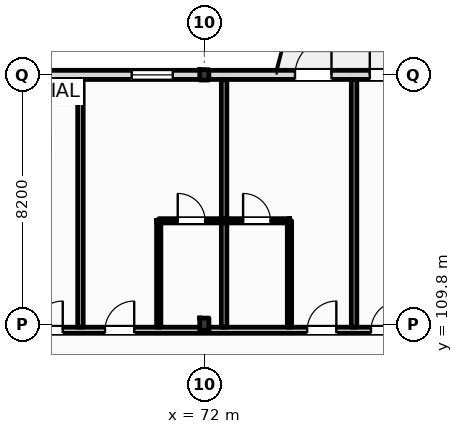
"""IFC4 building model, lengths in metres.
Left out: names, types, materials, properties, quantities, classifications, styles, units other than length and angle.
Written with IfcOpenShell. Run it as: python <this file> out.ifc"""

import sys

from ifc_helpers import new_model, si_unit, direction, frame, frame_2d, origin, origin_2d, place, context, subcontext, project, spatial, rectangle, i_section, extrude, element, fill, save


model = new_model("IFC4")
c1 = context("Model", 3, precision=1e-05, world=origin(), true_north=direction((0.0, 1.0)))
c2 = subcontext(c1, "Body", "Model", "MODEL_VIEW")
j1 = project(units=[si_unit("LENGTHUNIT", "METRE"), si_unit("PLANEANGLEUNIT", "RADIAN")], contexts=[c1])
p1 = place(None, origin())
s1 = spatial("IfcSite", under=j1, at=p1, CompositionType="ELEMENT")
p2 = place(p1, origin())
s2 = spatial("IfcBuilding", under=s1, at=p2, CompositionType="ELEMENT")
p3 = place(p2, frame((0.0, 0.0, 39.0)))
s3 = spatial("IfcBuildingStorey", under=s2, at=p3, CompositionType="ELEMENT", Elevation=39.0)
p4 = place(p3, frame((72.0, 109.8, 0.0), z_axis=(0.0, 0.0, 1.0), x_axis=(1.0, 0.0, 0.0)))
e1 = element("IfcColumn", 1, at=p4, inside=s3, PredefinedType="COLUMN", context=c2, shape_type="SweptSolid", body=[
    extrude(i_section(OverallWidth=0.3, OverallDepth=0.4, WebThickness=0.013, FlangeThickness=0.024, FilletRadius=0.027, at=origin_2d()), origin(), (0.0, 0.0, 1.0), 3.6),
])
p5 = place(p3, frame((72.0, 118.0, 0.0), z_axis=(0.0, 0.0, 1.0), x_axis=(1.0, 0.0, 0.0)))
e2 = element("IfcColumn", 2, at=p5, inside=s3, PredefinedType="COLUMN", context=c2, shape_type="SweptSolid", body=[
    extrude(i_section(OverallWidth=0.3, OverallDepth=0.34, WebThickness=0.012, FlangeThickness=0.021, FilletRadius=0.027, at=origin_2d()), origin(), (0.0, 0.0, 1.0), 3.6),
])
p6 = place(p3, frame((22.5, 118.0, 0.0), z_axis=(0.0, 0.0, 1.0), x_axis=(1.0, 0.0, 0.0)))
e3 = element("IfcWall", 3, at=p6, inside=s3, PredefinedType="STANDARD", context=c2, shape_type="SweptSolid", body=[
    extrude(rectangle(XDim=72.9, YDim=0.3, at=frame_2d((36.45, 0.0))), origin(), (0.0, 0.0, 1.0), 2.92),
])
p7 = place(p6, frame((3.6, 0.0, 0.9)))
e4 = element("IfcOpeningElement", 4, at=p7, cuts=e3, PredefinedType="OPENING", context=c2, shape_type="SweptSolid", body=[
    extrude(rectangle(XDim=1.1, YDim=1.6, at=frame_2d((0.55, 0.8))), frame((0.0, 0.16, 0.0), z_axis=(0.0, -1.0, 0.0), x_axis=(1.0, 0.0, 0.0)), (0.0, 0.0, 1.0), 0.32),
])
p8 = place(p6, frame((6.688, 0.0, 0.0)))
e5 = element("IfcOpeningElement", 5, at=p8, cuts=e3, PredefinedType="OPENING", context=c2, shape_type="SweptSolid", body=[
    extrude(rectangle(XDim=1.2, YDim=2.25, at=frame_2d((0.6, 1.125))), frame((0.0, 0.16, 0.0), z_axis=(0.0, -1.0, 0.0), x_axis=(1.0, 0.0, 0.0)), (0.0, 0.0, 1.0), 0.32),
])
p9 = place(p6, frame((11.388, 0.0, 0.9)))
e6 = element("IfcOpeningElement", 6, at=p9, cuts=e3, PredefinedType="OPENING", context=c2, shape_type="SweptSolid", body=[
    extrude(rectangle(XDim=1.6, YDim=1.75, at=frame_2d((0.8, 0.875))), frame((0.0, 0.16, 0.0), z_axis=(0.0, -1.0, 0.0), x_axis=(1.0, 0.0, 0.0)), (0.0, 0.0, 1.0), 0.32),
])
p10 = place(p6, frame((15.413, 0.0, 0.9)))
e7 = element("IfcOpeningElement", 7, at=p10, cuts=e3, PredefinedType="OPENING", context=c2, shape_type="SweptSolid", body=[
    extrude(rectangle(XDim=1.75, YDim=1.84, at=frame_2d((0.875, 0.92))), frame((0.0, 0.16, 0.0), z_axis=(0.0, -1.0, 0.0), x_axis=(1.0, 0.0, 0.0)), (0.0, 0.0, 1.0), 0.32),
])
p11 = place(p6, frame((21.245, 0.0, 0.0)))
e8 = element("IfcOpeningElement", 8, at=p11, cuts=e3, PredefinedType="OPENING", context=c2, shape_type="SweptSolid", body=[
    extrude(rectangle(XDim=1.2, YDim=2.25, at=frame_2d((0.6, 1.125))), frame((0.0, 0.16, 0.0), z_axis=(0.0, -1.0, 0.0), x_axis=(1.0, 0.0, 0.0)), (0.0, 0.0, 1.0), 0.32),
])
p12 = place(p6, frame((23.705, 0.0, 0.0)))
e9 = element("IfcOpeningElement", 9, at=p12, cuts=e3, PredefinedType="OPENING", context=c2, shape_type="SweptSolid", body=[
    extrude(rectangle(XDim=1.2, YDim=2.25, at=frame_2d((0.6, 1.125))), frame((0.0, 0.16, 0.0), z_axis=(0.0, -1.0, 0.0), x_axis=(1.0, 0.0, 0.0)), (0.0, 0.0, 1.0), 0.32),
])
p13 = place(p6, frame((28.488, 0.0, 0.9)))
e10 = element("IfcOpeningElement", 10, at=p13, cuts=e3, PredefinedType="OPENING", context=c2, shape_type="SweptSolid", body=[
    extrude(rectangle(XDim=2.6, YDim=1.84, at=frame_2d((1.3, 0.92))), frame((0.0, 0.16, 0.0), z_axis=(0.0, -1.0, 0.0), x_axis=(1.0, 0.0, 0.0)), (0.0, 0.0, 1.0), 0.32),
])
p14 = place(p6, frame((34.76, 0.0, 0.9)))
e11 = element("IfcOpeningElement", 11, at=p14, cuts=e3, PredefinedType="OPENING", context=c2, shape_type="SweptSolid", body=[
    extrude(rectangle(XDim=1.1, YDim=1.84, at=frame_2d((0.55, 0.92))), frame((0.0, 0.16, 0.0), z_axis=(0.0, -1.0, 0.0), x_axis=(1.0, 0.0, 0.0)), (0.0, 0.0, 1.0), 0.32),
])
p15 = place(p6, frame((38.143, 0.0, 0.0)))
e12 = element("IfcOpeningElement", 12, at=p15, cuts=e3, PredefinedType="OPENING", context=c2, shape_type="SweptSolid", body=[
    extrude(rectangle(XDim=1.2, YDim=2.25, at=frame_2d((0.6, 1.125))), frame((0.0, 0.16, 0.0), z_axis=(0.0, -1.0, 0.0), x_axis=(1.0, 0.0, 0.0)), (0.0, 0.0, 1.0), 0.32),
])
p16 = place(p6, frame((42.687, 0.0, 0.9)))
e13 = element("IfcOpeningElement", 13, at=p16, cuts=e3, PredefinedType="OPENING", context=c2, shape_type="SweptSolid", body=[
    extrude(rectangle(XDim=1.2, YDim=1.8, at=frame_2d((0.6, 0.9))), frame((0.0, 0.16, 0.0), z_axis=(0.0, -1.0, 0.0), x_axis=(1.0, 0.0, 0.0)), (0.0, 0.0, 1.0), 0.32),
])
p17 = place(p6, frame((47.112, 0.0, 0.9)))
e14 = element("IfcOpeningElement", 14, at=p17, cuts=e3, PredefinedType="OPENING", context=c2, shape_type="SweptSolid", body=[
    extrude(rectangle(XDim=1.35, YDim=1.84, at=frame_2d((0.675, 0.92))), frame((0.0, 0.16, 0.0), z_axis=(0.0, -1.0, 0.0), x_axis=(1.0, 0.0, 0.0)), (0.0, 0.0, 1.0), 0.32),
])
p18 = place(p6, frame((52.482, 0.0, 0.0)))
e15 = element("IfcOpeningElement", 15, at=p18, cuts=e3, PredefinedType="OPENING", context=c2, shape_type="SweptSolid", body=[
    extrude(rectangle(XDim=1.2, YDim=2.25, at=frame_2d((0.6, 1.125))), frame((0.0, 0.16, 0.0), z_axis=(0.0, -1.0, 0.0), x_axis=(1.0, 0.0, 0.0)), (0.0, 0.0, 1.0), 0.32),
])
p19 = place(p6, frame((54.942, 0.0, 0.0)))
e16 = element("IfcOpeningElement", 16, at=p19, cuts=e3, PredefinedType="OPENING", context=c2, shape_type="SweptSolid", body=[
    extrude(rectangle(XDim=1.2, YDim=2.25, at=frame_2d((0.6, 1.125))), frame((0.0, 0.16, 0.0), z_axis=(0.0, -1.0, 0.0), x_axis=(1.0, 0.0, 0.0)), (0.0, 0.0, 1.0), 0.32),
])
p20 = place(p6, frame((60.387, 0.0, 0.9)))
e17 = element("IfcOpeningElement", 17, at=p20, cuts=e3, PredefinedType="OPENING", context=c2, shape_type="SweptSolid", body=[
    extrude(rectangle(XDim=1.8, YDim=1.84, at=frame_2d((0.9, 0.92))), frame((0.0, 0.16, 0.0), z_axis=(0.0, -1.0, 0.0), x_axis=(1.0, 0.0, 0.0)), (0.0, 0.0, 1.0), 0.32),
])
p21 = place(p6, frame((66.013, 0.0, 0.9)))
e18 = element("IfcOpeningElement", 18, at=p21, cuts=e3, PredefinedType="OPENING", context=c2, shape_type="SweptSolid", body=[
    extrude(rectangle(XDim=1.35, YDim=1.84, at=frame_2d((0.675, 0.92))), frame((0.0, 0.16, 0.0), z_axis=(0.0, -1.0, 0.0), x_axis=(1.0, 0.0, 0.0)), (0.0, 0.0, 1.0), 0.32),
])
p22 = place(p6, frame((69.275, 0.0, 0.9)))
e19 = element("IfcOpeningElement", 19, at=p22, cuts=e3, PredefinedType="OPENING", context=c2, shape_type="SweptSolid", body=[
    extrude(rectangle(XDim=2.1, YDim=1.84, at=frame_2d((1.05, 0.92))), frame((0.0, 0.16, 0.0), z_axis=(0.0, -1.0, 0.0), x_axis=(1.0, 0.0, 0.0)), (0.0, 0.0, 1.0), 0.32),
])
p23 = place(p3, frame((10.65, 109.6, 0.0), z_axis=(0.0, 0.0, 1.0), x_axis=(1.0, 0.0, 0.0)))
e20 = element("IfcWall", 20, at=p23, inside=s3, PredefinedType="PARTITIONING", context=c2, shape_type="SweptSolid", body=[
    extrude(rectangle(XDim=84.61, YDim=0.2, at=frame_2d((42.305, 0.0))), origin(), (0.0, 0.0, 1.0), 2.82),
])
p24 = place(p23, frame((15.49, 0.0, 0.0)))
e21 = element("IfcOpeningElement", 21, at=p24, cuts=e20, PredefinedType="OPENING", context=c2, shape_type="SweptSolid", body=[
    extrude(rectangle(XDim=1.02, YDim=2.2, at=frame_2d((0.51, 1.1))), frame((0.0, 0.11, 0.0), z_axis=(0.0, -1.0, 0.0), x_axis=(1.0, 0.0, 0.0)), (0.0, 0.0, 1.0), 0.22),
])
p25 = place(p23, frame((19.703, 0.0, 0.0)))
e22 = element("IfcOpeningElement", 22, at=p25, cuts=e20, PredefinedType="OPENING", context=c2, shape_type="SweptSolid", body=[
    extrude(rectangle(XDim=1.02, YDim=2.2, at=frame_2d((0.51, 1.1))), frame((0.0, 0.11, 0.0), z_axis=(0.0, -1.0, 0.0), x_axis=(1.0, 0.0, 0.0)), (0.0, 0.0, 1.0), 0.22),
])
p26 = place(p23, frame((24.203, 0.0, 0.0)))
e23 = element("IfcOpeningElement", 23, at=p26, cuts=e20, PredefinedType="OPENING", context=c2, shape_type="SweptSolid", body=[
    extrude(rectangle(XDim=1.02, YDim=2.2, at=frame_2d((0.51, 1.1))), frame((0.0, 0.11, 0.0), z_axis=(0.0, -1.0, 0.0), x_axis=(1.0, 0.0, 0.0)), (0.0, 0.0, 1.0), 0.22),
])
p27 = place(p23, frame((26.552, 0.0, 0.0)))
e24 = element("IfcOpeningElement", 24, at=p27, cuts=e20, PredefinedType="OPENING", context=c2, shape_type="SweptSolid", body=[
    extrude(rectangle(XDim=1.02, YDim=2.2, at=frame_2d((0.51, 1.1))), frame((0.0, 0.11, 0.0), z_axis=(0.0, -1.0, 0.0), x_axis=(1.0, 0.0, 0.0)), (0.0, 0.0, 1.0), 0.22),
])
p28 = place(p23, frame((33.233, 0.0, 0.0)))
e25 = element("IfcOpeningElement", 25, at=p28, cuts=e20, PredefinedType="OPENING", context=c2, shape_type="SweptSolid", body=[
    extrude(rectangle(XDim=0.96, YDim=2.2, at=frame_2d((0.48, 1.1))), frame((0.0, 0.11, 0.0), z_axis=(0.0, -1.0, 0.0), x_axis=(1.0, 0.0, 0.0)), (0.0, 0.0, 1.0), 0.22),
])
p29 = place(p23, frame((35.583, 0.0, 0.0)))
e26 = element("IfcOpeningElement", 26, at=p29, cuts=e20, PredefinedType="OPENING", context=c2, shape_type="SweptSolid", body=[
    extrude(rectangle(XDim=0.96, YDim=2.2, at=frame_2d((0.48, 1.1))), frame((0.0, 0.11, 0.0), z_axis=(0.0, -1.0, 0.0), x_axis=(1.0, 0.0, 0.0)), (0.0, 0.0, 1.0), 0.22),
])
p30 = place(p23, frame((42.233, 0.0, 0.0)))
e27 = element("IfcOpeningElement", 27, at=p30, cuts=e20, PredefinedType="OPENING", context=c2, shape_type="SweptSolid", body=[
    extrude(rectangle(XDim=0.96, YDim=2.2, at=frame_2d((0.48, 1.1))), frame((0.0, 0.11, 0.0), z_axis=(0.0, -1.0, 0.0), x_axis=(1.0, 0.0, 0.0)), (0.0, 0.0, 1.0), 0.22),
])
p31 = place(p23, frame((46.983, 0.0, 0.0)))
e28 = element("IfcOpeningElement", 28, at=p31, cuts=e20, PredefinedType="OPENING", context=c2, shape_type="SweptSolid", body=[
    extrude(rectangle(XDim=0.96, YDim=2.2, at=frame_2d((0.48, 1.1))), frame((0.0, 0.11, 0.0), z_axis=(0.0, -1.0, 0.0), x_axis=(1.0, 0.0, 0.0)), (0.0, 0.0, 1.0), 0.22),
])
p32 = place(p23, frame((51.233, 0.0, 0.0)))
e29 = element("IfcOpeningElement", 29, at=p32, cuts=e20, PredefinedType="OPENING", context=c2, shape_type="SweptSolid", body=[
    extrude(rectangle(XDim=0.96, YDim=2.2, at=frame_2d((0.48, 1.1))), frame((0.0, 0.11, 0.0), z_axis=(0.0, -1.0, 0.0), x_axis=(1.0, 0.0, 0.0)), (0.0, 0.0, 1.0), 0.22),
])
p33 = place(p23, frame((55.733, 0.0, 0.0)))
e30 = element("IfcOpeningElement", 30, at=p33, cuts=e20, PredefinedType="OPENING", context=c2, shape_type="SweptSolid", body=[
    extrude(rectangle(XDim=0.96, YDim=2.2, at=frame_2d((0.48, 1.1))), frame((0.0, 0.11, 0.0), z_axis=(0.0, -1.0, 0.0), x_axis=(1.0, 0.0, 0.0)), (0.0, 0.0, 1.0), 0.22),
])
p34 = place(p23, frame((58.083, 0.0, 0.0)))
e31 = element("IfcOpeningElement", 31, at=p34, cuts=e20, PredefinedType="OPENING", context=c2, shape_type="SweptSolid", body=[
    extrude(rectangle(XDim=0.96, YDim=2.2, at=frame_2d((0.48, 1.1))), frame((0.0, 0.11, 0.0), z_axis=(0.0, -1.0, 0.0), x_axis=(1.0, 0.0, 0.0)), (0.0, 0.0, 1.0), 0.22),
])
p35 = place(p23, frame((64.732, 0.0, 0.0)))
e32 = element("IfcOpeningElement", 32, at=p35, cuts=e20, PredefinedType="OPENING", context=c2, shape_type="SweptSolid", body=[
    extrude(rectangle(XDim=0.96, YDim=2.2, at=frame_2d((0.48, 1.1))), frame((0.0, 0.11, 0.0), z_axis=(0.0, -1.0, 0.0), x_axis=(1.0, 0.0, 0.0)), (0.0, 0.0, 1.0), 0.22),
])
p36 = place(p23, frame((66.832, 0.0, 0.0)))
e33 = element("IfcOpeningElement", 33, at=p36, cuts=e20, PredefinedType="OPENING", context=c2, shape_type="SweptSolid", body=[
    extrude(rectangle(XDim=0.96, YDim=2.2, at=frame_2d((0.48, 1.1))), frame((0.0, 0.11, 0.0), z_axis=(0.0, -1.0, 0.0), x_axis=(1.0, 0.0, 0.0)), (0.0, 0.0, 1.0), 0.22),
])
p37 = place(p23, frame((73.732, 0.0, 0.0)))
e34 = element("IfcOpeningElement", 34, at=p37, cuts=e20, PredefinedType="OPENING", context=c2, shape_type="SweptSolid", body=[
    extrude(rectangle(XDim=0.96, YDim=2.2, at=frame_2d((0.48, 1.1))), frame((0.0, 0.11, 0.0), z_axis=(0.0, -1.0, 0.0), x_axis=(1.0, 0.0, 0.0)), (0.0, 0.0, 1.0), 0.22),
])
p38 = place(p23, frame((78.233, 0.0, 0.0)))
e35 = element("IfcOpeningElement", 35, at=p38, cuts=e20, PredefinedType="OPENING", context=c2, shape_type="SweptSolid", body=[
    extrude(rectangle(XDim=0.96, YDim=2.2, at=frame_2d((0.48, 1.1))), frame((0.0, 0.11, 0.0), z_axis=(0.0, -1.0, 0.0), x_axis=(1.0, 0.0, 0.0)), (0.0, 0.0, 1.0), 0.22),
])
p39 = place(p23, frame((80.62, 0.0, 0.0)))
e36 = element("IfcOpeningElement", 36, at=p39, cuts=e20, PredefinedType="OPENING", context=c2, shape_type="SweptSolid", body=[
    extrude(rectangle(XDim=0.96, YDim=2.2, at=frame_2d((0.48, 1.1))), frame((0.0, 0.11, 0.0), z_axis=(0.0, -1.0, 0.0), x_axis=(1.0, 0.0, 0.0)), (0.0, 0.0, 1.0), 0.22),
])
p40 = place(p23, frame((2.716, 0.0, 0.0)))
e37 = element("IfcOpeningElement", 37, at=p40, cuts=e20, PredefinedType="OPENING", context=c2, shape_type="SweptSolid", body=[
    extrude(rectangle(XDim=1.35, YDim=2.25, at=frame_2d((0.675, 1.125))), frame((0.0, 0.11, 0.0), z_axis=(0.0, -1.0, 0.0), x_axis=(1.0, 0.0, 0.0)), (0.0, 0.0, 1.0), 0.22),
])
p41 = place(p23, frame((6.65, 0.0, 0.0)))
e38 = element("IfcOpeningElement", 38, at=p41, cuts=e20, PredefinedType="OPENING", context=c2, shape_type="SweptSolid", body=[
    extrude(rectangle(XDim=1.35, YDim=2.25, at=frame_2d((0.675, 1.125))), frame((0.0, 0.11, 0.0), z_axis=(0.0, -1.0, 0.0), x_axis=(1.0, 0.0, 0.0)), (0.0, 0.0, 1.0), 0.22),
])
p42 = place(p23, frame((10.583, 0.0, 0.0)))
e39 = element("IfcOpeningElement", 39, at=p42, cuts=e20, PredefinedType="OPENING", context=c2, shape_type="SweptSolid", body=[
    extrude(rectangle(XDim=1.35, YDim=2.25, at=frame_2d((0.675, 1.125))), frame((0.0, 0.11, 0.0), z_axis=(0.0, -1.0, 0.0), x_axis=(1.0, 0.0, 0.0)), (0.0, 0.0, 1.0), 0.22),
])
for number, where, z_axis, x_axis in (
    (40, (67.925, 109.7, 0.0), (0.0, 0.0, 1.0), (0.0, 1.0, 0.0)),
    (41, (72.65, 109.7, 0.0), (0.0, 0.0, 1.0), (0.0, 1.0, 0.0)),
):
    element("IfcWall", number, at=place(p3, frame(where, z_axis=z_axis, x_axis=x_axis)), inside=s3, PredefinedType="PARTITIONING", context=c2, shape_type="SweptSolid", body=[
        extrude(rectangle(XDim=8.15, YDim=0.18, at=frame_2d((4.075, 0.0))), origin(), (0.0, 0.0, 1.0), 3.38),
    ])
p43 = place(p3, frame((70.5, 109.7, 0.0), z_axis=(0.0, 0.0, 1.0), x_axis=(0.0, 1.0, 0.0)))
e42 = element("IfcWall", 42, at=p43, inside=s3, PredefinedType="PARTITIONING", context=c2, shape_type="SweptSolid", body=[
    extrude(rectangle(XDim=3.5, YDim=0.14, at=frame_2d((1.75, 0.0))), origin(), (0.0, 0.0, 1.0), 3.38),
])
p44 = place(p3, frame((70.5, 113.2, 0.0), z_axis=(0.0, 0.0, 1.0), x_axis=(1.0, 0.0, 0.0)))
e43 = element("IfcWall", 43, at=p44, inside=s3, PredefinedType="PARTITIONING", context=c2, shape_type="SweptSolid", body=[
    extrude(rectangle(XDim=2.15, YDim=0.14, at=frame_2d((1.075, 0.0))), origin(), (0.0, 0.0, 1.0), 3.38),
])
p45 = place(p44, frame((0.625, 0.0, 0.0)))
e44 = element("IfcOpeningElement", 44, at=p45, cuts=e43, PredefinedType="OPENING", context=c2, shape_type="SweptSolid", body=[
    extrude(rectangle(XDim=0.9, YDim=2.1, at=frame_2d((0.45, 1.05))), frame((0.0, 0.08, 0.0), z_axis=(0.0, -1.0, 0.0), x_axis=(1.0, 0.0, 0.0)), (0.0, 0.0, 1.0), 0.16),
])
p46 = place(p3, frame((76.925, 109.7, 0.0), z_axis=(0.0, 0.0, 1.0), x_axis=(0.0, 1.0, 0.0)))
e45 = element("IfcWall", 45, at=p46, inside=s3, PredefinedType="PARTITIONING", context=c2, shape_type="SweptSolid", body=[
    extrude(rectangle(XDim=8.15, YDim=0.18, at=frame_2d((4.075, 0.0))), origin(), (0.0, 0.0, 1.0), 3.38),
])
p47 = place(p3, frame((74.8, 109.7, 0.0), z_axis=(0.0, 0.0, 1.0), x_axis=(0.0, 1.0, 0.0)))
e46 = element("IfcWall", 46, at=p47, inside=s3, PredefinedType="PARTITIONING", context=c2, shape_type="SweptSolid", body=[
    extrude(rectangle(XDim=3.5, YDim=0.14, at=frame_2d((1.75, 0.0))), origin(), (0.0, 0.0, 1.0), 3.07),
])
p48 = place(p3, frame((72.65, 113.2, 0.0), z_axis=(0.0, 0.0, 1.0), x_axis=(1.0, 0.0, 0.0)))
e47 = element("IfcWall", 47, at=p48, inside=s3, PredefinedType="PARTITIONING", context=c2, shape_type="SweptSolid", body=[
    extrude(rectangle(XDim=2.15, YDim=0.14, at=frame_2d((1.075, 0.0))), origin(), (0.0, 0.0, 1.0), 3.38),
])
p49 = place(p48, frame((0.625, 0.0, 0.0)))
e48 = element("IfcOpeningElement", 48, at=p49, cuts=e47, PredefinedType="OPENING", context=c2, shape_type="SweptSolid", body=[
    extrude(rectangle(XDim=0.9, YDim=2.1, at=frame_2d((0.45, 1.05))), frame((0.0, 0.08, 0.0), z_axis=(0.0, -1.0, 0.0), x_axis=(1.0, 0.0, 0.0)), (0.0, 0.0, 1.0), 0.16),
])
p50 = place(p17, origin())
e49 = element("IfcWindow", 49, at=p50, inside=s3, PartitioningType="DOUBLE_PANEL_VERTICAL", PredefinedType="WINDOW", context=c2, shape_type="SweptSolid", body=[
    extrude(rectangle(XDim=1.35, YDim=1.84, at=frame_2d((0.675, 0.92))), frame((0.0, 0.03, 0.0), z_axis=(0.0, -1.0, 0.0), x_axis=(1.0, 0.0, 0.0)), (0.0, 0.0, 1.0), 0.06),
])
fill(e14, e49)
p51 = place(p18, origin())
e50 = element("IfcDoor", 50, at=p51, inside=s3, OperationType="SINGLE_SWING_RIGHT", PredefinedType="DOOR", context=c2, shape_type="SweptSolid", body=[
    extrude(rectangle(XDim=1.2, YDim=2.25, at=frame_2d((0.6, 1.125))), frame((0.0, 0.025, 0.0), z_axis=(0.0, -1.0, 0.0), x_axis=(1.0, 0.0, 0.0)), (0.0, 0.0, 1.0), 0.05),
])
fill(e15, e50)
p52 = place(p19, origin())
e51 = element("IfcDoor", 51, at=p52, inside=s3, OperationType="SINGLE_SWING_LEFT", PredefinedType="DOOR", context=c2, shape_type="SweptSolid", body=[
    extrude(rectangle(XDim=1.2, YDim=2.25, at=frame_2d((0.6, 1.125))), frame((0.0, 0.025, 0.0), z_axis=(0.0, -1.0, 0.0), x_axis=(1.0, 0.0, 0.0)), (0.0, 0.0, 1.0), 0.05),
])
fill(e16, e51)
p53 = place(p33, origin())
e52 = element("IfcDoor", 52, at=p53, inside=s3, OperationType="SINGLE_SWING_RIGHT", PredefinedType="DOOR", context=c2, shape_type="SweptSolid", body=[
    extrude(rectangle(XDim=0.96, YDim=2.2, at=frame_2d((0.48, 1.1))), frame((0.0, 0.025, 0.0), z_axis=(0.0, -1.0, 0.0), x_axis=(1.0, 0.0, 0.0)), (0.0, 0.0, 1.0), 0.05),
])
fill(e30, e52)
p54 = place(p34, origin())
e53 = element("IfcDoor", 53, at=p54, inside=s3, OperationType="SINGLE_SWING_RIGHT", PredefinedType="DOOR", context=c2, shape_type="SweptSolid", body=[
    extrude(rectangle(XDim=0.96, YDim=2.2, at=frame_2d((0.48, 1.1))), frame((0.0, 0.025, 0.0), z_axis=(0.0, -1.0, 0.0), x_axis=(1.0, 0.0, 0.0)), (0.0, 0.0, 1.0), 0.05),
])
fill(e31, e53)
p55 = place(p45, origin())
e54 = element("IfcDoor", 54, at=p55, inside=s3, OperationType="SINGLE_SWING_LEFT", PredefinedType="DOOR", context=c2, shape_type="SweptSolid", body=[
    extrude(rectangle(XDim=0.9, YDim=2.1, at=frame_2d((0.45, 1.05))), frame((0.0, 0.025, 0.0), z_axis=(0.0, -1.0, 0.0), x_axis=(1.0, 0.0, 0.0)), (0.0, 0.0, 1.0), 0.05),
])
fill(e44, e54)
p56 = place(p35, origin())
e55 = element("IfcDoor", 55, at=p56, inside=s3, OperationType="SINGLE_SWING_RIGHT", PredefinedType="DOOR", context=c2, shape_type="SweptSolid", body=[
    extrude(rectangle(XDim=0.96, YDim=2.2, at=frame_2d((0.48, 1.1))), frame((0.0, 0.025, 0.0), z_axis=(0.0, -1.0, 0.0), x_axis=(1.0, 0.0, 0.0)), (0.0, 0.0, 1.0), 0.05),
])
fill(e32, e55)
p57 = place(p49, origin())
e56 = element("IfcDoor", 56, at=p57, inside=s3, OperationType="SINGLE_SWING_LEFT", PredefinedType="DOOR", context=c2, shape_type="SweptSolid", body=[
    extrude(rectangle(XDim=0.9, YDim=2.1, at=frame_2d((0.45, 1.05))), frame((0.0, 0.025, 0.0), z_axis=(0.0, -1.0, 0.0), x_axis=(1.0, 0.0, 0.0)), (0.0, 0.0, 1.0), 0.05),
])
fill(e48, e56)
p58 = place(p36, origin())
e57 = element("IfcDoor", 57, at=p58, inside=s3, OperationType="SINGLE_SWING_RIGHT", PredefinedType="DOOR", context=c2, shape_type="SweptSolid", body=[
    extrude(rectangle(XDim=0.96, YDim=2.2, at=frame_2d((0.48, 1.1))), frame((0.0, 0.025, 0.0), z_axis=(0.0, -1.0, 0.0), x_axis=(1.0, 0.0, 0.0)), (0.0, 0.0, 1.0), 0.05),
])
fill(e33, e57)
save(model, sys.argv[1])
